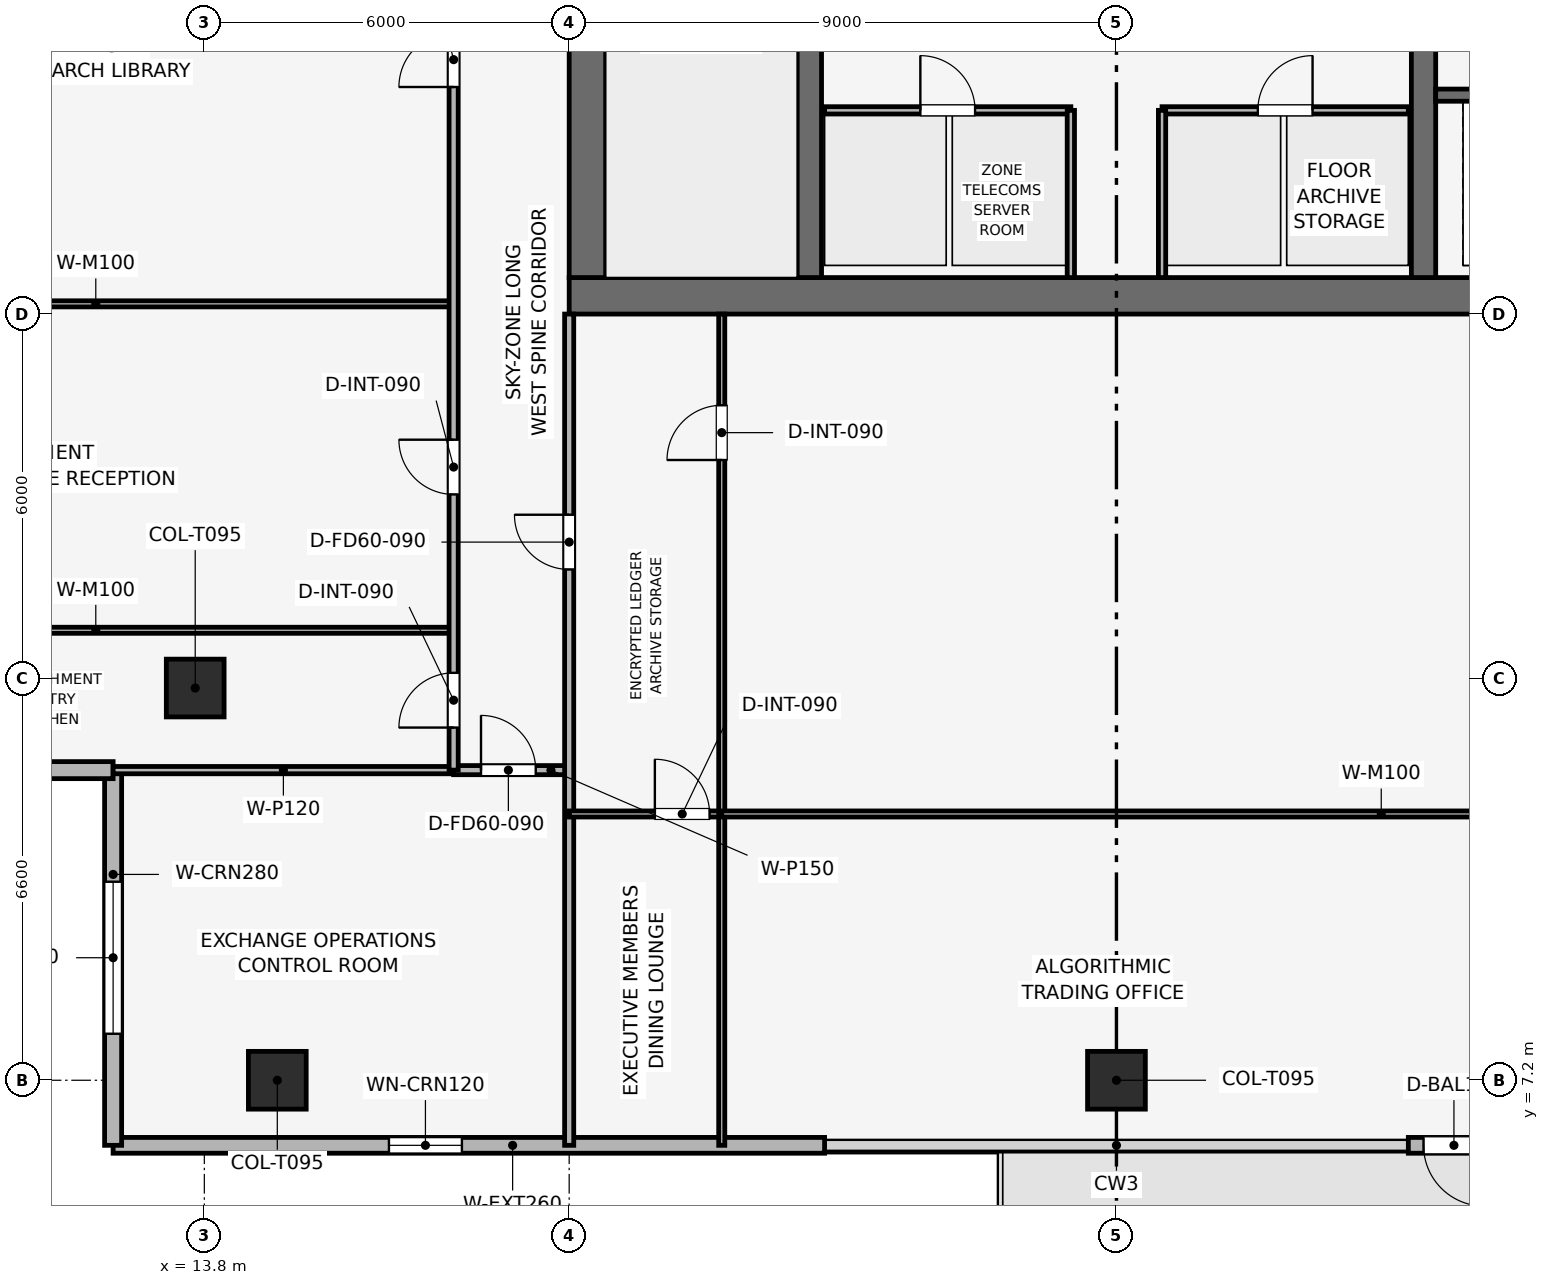
"""IFC4 building model, lengths in metres.
Left out: names, types, materials, properties, quantities, classifications, styles, units other than length and angle.
Written with IfcOpenShell. Run it as: python <this file> out.ifc"""

import sys

from ifc_helpers import new_model, si_unit, direction, frame, frame_2d, origin, origin_2d, place, context, subcontext, project, spatial, rectangle, extrude, element, fill, save


model = new_model("IFC4")
c1 = context("Model", 3, precision=1e-05, world=origin(), true_north=direction((0.0, 1.0)))
c2 = subcontext(c1, "Body", "Model", "MODEL_VIEW")
j1 = project(units=[si_unit("LENGTHUNIT", "METRE"), si_unit("PLANEANGLEUNIT", "RADIAN")], contexts=[c1])
p1 = place(None, origin())
s1 = spatial("IfcSite", under=j1, at=p1, CompositionType="ELEMENT")
p2 = place(p1, origin())
s2 = spatial("IfcBuilding", under=s1, at=p2, CompositionType="ELEMENT")
p3 = place(p2, frame((0.0, 0.0, 321.75)))
s3 = spatial("IfcBuildingStorey", under=s2, at=p3, CompositionType="ELEMENT", Elevation=321.75)
p4 = place(p3, frame((19.8, 20.1, 0.0), z_axis=(0.0, 0.0, 1.0), x_axis=(1.0, 0.0, 0.0)))
e1 = element("IfcWall", 1, at=p4, inside=s3, PredefinedType="SHEAR", context=c2, shape_type="SweptSolid", body=[
    extrude(rectangle(XDim=18.0, YDim=0.6, at=frame_2d((9.0, 0.0))), origin(), (0.0, 0.0, 1.0), 3.75),
])
p5 = place(p3, frame((20.1, 20.4, 0.0), z_axis=(0.0, 0.0, 1.0), x_axis=(0.0, 1.0, 0.0)))
e2 = element("IfcWall", 2, at=p5, inside=s3, PredefinedType="SHEAR", context=c2, shape_type="SweptSolid", body=[
    extrude(rectangle(XDim=16.8, YDim=0.6, at=frame_2d((8.4, 0.0))), origin(), (0.0, 0.0, 1.0), 3.75),
])
p6 = place(p5, frame((10.4, 0.0, 0.0)))
e3 = element("IfcOpeningElement", 3, at=p6, cuts=e2, PredefinedType="OPENING", context=c2, shape_type="SweptSolid", body=[
    extrude(rectangle(XDim=1.1, YDim=2.15, at=frame_2d((0.55, 1.075))), frame((0.0, 0.31, 0.0), z_axis=(0.0, -1.0, 0.0), x_axis=(1.0, 0.0, 0.0)), (0.0, 0.0, 1.0), 0.62),
])
for number, where, z_axis, x_axis in (
    (4, (23.75, 20.4, 0.0), (0.0, 0.0, 1.0), (0.0, 1.0, 0.0)),
    (5, (33.85, 20.4, 0.0), (0.0, 0.0, 1.0), (0.0, 1.0, 0.0)),
):
    element("IfcWall", number, at=place(p3, frame(where, z_axis=z_axis, x_axis=x_axis)), inside=s3, PredefinedType="SHEAR", context=c2, shape_type="SweptSolid", body=[
        extrude(rectangle(XDim=16.8, YDim=0.4, at=frame_2d((8.4, 0.0))), origin(), (0.0, 0.0, 1.0), 3.75),
    ])
for number, where, z_axis, x_axis in (
    (6, (15.0, 7.2, 0.003), (0.0, 0.0, 1.0), (1.0, 0.0, 0.0)),
    (7, (28.8, 7.2, 0.003), (0.0, 0.0, 1.0), (1.0, 0.0, 0.0)),
    (8, (13.65, 13.65, 0.003), (0.0, 0.0, 1.0), (1.0, 0.0, 0.0)),
):
    element("IfcColumn", number, at=place(p3, frame(where, z_axis=z_axis, x_axis=x_axis)), inside=s3, PredefinedType="COLUMN", context=c2, shape_type="SweptSolid", body=[
        extrude(rectangle(XDim=0.95, YDim=0.95, at=origin_2d()), origin(), (0.0, 0.0, 1.0), 3.504),
    ])
p7 = place(p3, frame((45.3, 6.13, 0.0), z_axis=(0.0, 0.0, 1.0), x_axis=(-1.0, 0.0, 0.0)))
e9 = element("IfcWall", 9, at=p7, inside=s3, PredefinedType="SOLIDWALL", context=c2, shape_type="SweptSolid", body=[
    extrude(rectangle(XDim=11.7, YDim=0.26, at=frame_2d((5.85, 0.0))), origin(), (0.0, 0.0, 1.0), 3.51),
])
p8 = place(p7, frame((10.45, 0.0, 0.0)))
e10 = element("IfcOpeningElement", 10, at=p8, cuts=e9, PredefinedType="OPENING", context=c2, shape_type="SweptSolid", body=[
    extrude(rectangle(XDim=1.0, YDim=2.2, at=frame_2d((0.5, 1.1))), frame((0.0, 0.14, 0.0), z_axis=(0.0, -1.0, 0.0), x_axis=(1.0, 0.0, 0.0)), (0.0, 0.0, 1.0), 0.28),
])
p9 = place(p3, frame((24.0, 6.13, 0.0), z_axis=(0.0, 0.0, 1.0), x_axis=(-1.0, 0.0, 0.0)))
e11 = element("IfcWall", 11, at=p9, inside=s3, PredefinedType="SOLIDWALL", context=c2, shape_type="SweptSolid", body=[
    extrude(rectangle(XDim=11.7, YDim=0.26, at=frame_2d((5.85, 0.0))), origin(), (0.0, 0.0, 1.0), 3.51),
])
p10 = place(p9, frame((5.964, 0.0, 0.9)))
e12 = element("IfcOpeningElement", 12, at=p10, cuts=e11, PredefinedType="OPENING", context=c2, shape_type="SweptSolid", body=[
    extrude(rectangle(XDim=1.2, YDim=2.1, at=frame_2d((0.6, 1.05))), frame((0.0, 0.14, 0.0), z_axis=(0.0, -1.0, 0.0), x_axis=(1.0, 0.0, 0.0)), (0.0, 0.0, 1.0), 0.28),
])
p11 = place(p3, frame((12.3, 6.13, 0.0), z_axis=(0.0, 0.0, 1.0), x_axis=(0.0, 1.0, 0.0)))
e13 = element("IfcWall", 13, at=p11, inside=s3, PredefinedType="SOLIDWALL", context=c2, shape_type="SweptSolid", body=[
    extrude(rectangle(XDim=6.17, YDim=0.28, at=frame_2d((3.085, 0.0))), origin(), (0.0, 0.0, 1.0), 3.51),
])
p12 = place(p11, frame((1.835, 0.0, 0.9)))
e14 = element("IfcOpeningElement", 14, at=p12, cuts=e13, PredefinedType="OPENING", context=c2, shape_type="SweptSolid", body=[
    extrude(rectangle(XDim=2.5, YDim=1.9, at=frame_2d((1.25, 0.95))), frame((0.0, 0.15, 0.0), z_axis=(0.0, -1.0, 0.0), x_axis=(1.0, 0.0, 0.0)), (0.0, 0.0, 1.0), 0.3),
])
p13 = place(p3, frame((12.3, 12.3, 0.0), z_axis=(0.0, 0.0, 1.0), x_axis=(-1.0, 0.0, 0.0)))
e15 = element("IfcWall", 15, at=p13, inside=s3, PredefinedType="SOLIDWALL", context=c2, shape_type="SweptSolid", body=[
    extrude(rectangle(XDim=6.17, YDim=0.28, at=frame_2d((3.085, 0.0))), origin(), (0.0, 0.0, 1.0), 3.51),
])
p14 = place(p13, frame((1.835, 0.0, 0.9)))
e16 = element("IfcOpeningElement", 16, at=p14, cuts=e15, PredefinedType="OPENING", context=c2, shape_type="SweptSolid", body=[
    extrude(rectangle(XDim=2.5, YDim=1.9, at=frame_2d((1.25, 0.95))), frame((0.0, 0.15, 0.0), z_axis=(0.0, -1.0, 0.0), x_axis=(1.0, 0.0, 0.0)), (0.0, 0.0, 1.0), 0.3),
])
p15 = place(p3, frame((34.05, 23.4, 0.0), z_axis=(0.0, 0.0, 1.0), x_axis=(1.0, 0.0, 0.0)))
e17 = element("IfcWall", 17, at=p15, inside=s3, PredefinedType="SHEAR", context=c2, shape_type="SweptSolid", body=[
    extrude(rectangle(XDim=3.05, YDim=0.2, at=frame_2d((1.525, 0.0))), origin(), (0.0, 0.0, 1.0), 3.51),
])
p16 = place(p15, frame((1.2, 0.0, 0.0)))
e18 = element("IfcOpeningElement", 18, at=p16, cuts=e17, PredefinedType="OPENING", context=c2, shape_type="SweptSolid", body=[
    extrude(rectangle(XDim=1.1, YDim=2.15, at=frame_2d((0.55, 1.075))), frame((0.0, 0.11, 0.0), z_axis=(0.0, -1.0, 0.0), x_axis=(1.0, 0.0, 0.0)), (0.0, 0.0, 1.0), 0.22),
])
p17 = place(p3, frame((24.0, 23.15, 0.0), z_axis=(0.0, 0.0, 1.0), x_axis=(1.0, 0.0, 0.0)))
e19 = element("IfcWall", 19, at=p17, inside=s3, PredefinedType="PARTITIONING", context=c2, shape_type="SweptSolid", body=[
    extrude(rectangle(XDim=4.05, YDim=0.12, at=frame_2d((2.025, 0.0))), origin(), (0.0, 0.0, 1.0), 3.51),
])
p18 = place(p17, frame((1.575, 0.0, 0.0)))
e20 = element("IfcOpeningElement", 20, at=p18, cuts=e19, PredefinedType="OPENING", context=c2, shape_type="SweptSolid", body=[
    extrude(rectangle(XDim=0.9, YDim=2.1, at=frame_2d((0.45, 1.05))), frame((0.0, 0.07, 0.0), z_axis=(0.0, -1.0, 0.0), x_axis=(1.0, 0.0, 0.0)), (0.0, 0.0, 1.0), 0.14),
])
p19 = place(p3, frame((28.05, 20.4, 0.0), z_axis=(0.0, 0.0, 1.0), x_axis=(0.0, 1.0, 0.0)))
e21 = element("IfcWall", 21, at=p19, inside=s3, PredefinedType="PARTITIONING", context=c2, shape_type="SweptSolid", body=[
    extrude(rectangle(XDim=2.75, YDim=0.12, at=frame_2d((1.375, 0.0))), origin(), (0.0, 0.0, 1.0), 3.51),
])
p20 = place(p3, frame((29.55, 23.15, 0.0), z_axis=(0.0, 0.0, 1.0), x_axis=(1.0, 0.0, 0.0)))
e22 = element("IfcWall", 22, at=p20, inside=s3, PredefinedType="PARTITIONING", context=c2, shape_type="SweptSolid", body=[
    extrude(rectangle(XDim=4.05, YDim=0.12, at=frame_2d((2.025, 0.0))), origin(), (0.0, 0.0, 1.0), 3.51),
])
p21 = place(p20, frame((1.575, 0.0, 0.0)))
e23 = element("IfcOpeningElement", 23, at=p21, cuts=e22, PredefinedType="OPENING", context=c2, shape_type="SweptSolid", body=[
    extrude(rectangle(XDim=0.9, YDim=2.1, at=frame_2d((0.45, 1.05))), frame((0.0, 0.07, 0.0), z_axis=(0.0, -1.0, 0.0), x_axis=(1.0, 0.0, 0.0)), (0.0, 0.0, 1.0), 0.14),
])
p22 = place(p3, frame((29.55, 20.4, 0.0), z_axis=(0.0, 0.0, 1.0), x_axis=(0.0, 1.0, 0.0)))
e24 = element("IfcWall", 24, at=p22, inside=s3, PredefinedType="PARTITIONING", context=c2, shape_type="SweptSolid", body=[
    extrude(rectangle(XDim=2.75, YDim=0.12, at=frame_2d((1.375, 0.0))), origin(), (0.0, 0.0, 1.0), 3.51),
])
p23 = place(p3, frame((6.13, 14.6, 0.0), z_axis=(0.0, 0.0, 1.0), x_axis=(1.0, 0.0, 0.0)))
e25 = element("IfcWall", 25, at=p23, inside=s3, PredefinedType="MOVABLE", context=c2, shape_type="SweptSolid", body=[
    extrude(rectangle(XDim=11.77, YDim=0.1, at=frame_2d((5.885, 0.0))), origin(), (0.0, 0.0, 1.0), 3.095),
])
p24 = place(p3, frame((6.13, 19.968, 0.0), z_axis=(0.0, 0.0, 1.0), x_axis=(1.0, 0.0, 0.0)))
e26 = element("IfcWall", 26, at=p24, inside=s3, PredefinedType="MOVABLE", context=c2, shape_type="SweptSolid", body=[
    extrude(rectangle(XDim=11.77, YDim=0.1, at=frame_2d((5.885, 0.0))), origin(), (0.0, 0.0, 1.0), 3.195),
])
p25 = place(p3, frame((12.3, 12.3, 0.0), z_axis=(0.0, 0.0, 1.0), x_axis=(1.0, 0.0, 0.0)))
e27 = element("IfcWall", 27, at=p25, inside=s3, PredefinedType="PARTITIONING", context=c2, shape_type="SweptSolid", body=[
    extrude(rectangle(XDim=5.6, YDim=0.12, at=frame_2d((2.8, 0.0))), origin(), (0.0, 0.0, 1.0), 3.195),
])
p26 = place(p3, frame((17.9, 12.3, 0.0), z_axis=(0.0, 0.0, 1.0), x_axis=(1.0, 0.0, 0.0)))
e28 = element("IfcWall", 28, at=p26, inside=s3, PredefinedType="PARTITIONING", context=c2, shape_type="SweptSolid", body=[
    extrude(rectangle(XDim=1.9, YDim=0.15, at=frame_2d((0.95, 0.0))), origin(), (0.0, 0.0, 1.0), 3.51),
])
p27 = place(p26, frame((0.45, 0.0, 0.0)))
e29 = element("IfcOpeningElement", 29, at=p27, cuts=e28, PredefinedType="OPENING", context=c2, shape_type="SweptSolid", body=[
    extrude(rectangle(XDim=0.9, YDim=2.1, at=frame_2d((0.45, 1.05))), frame((0.0, 0.085, 0.0), z_axis=(0.0, -1.0, 0.0), x_axis=(1.0, 0.0, 0.0)), (0.0, 0.0, 1.0), 0.17),
])
p28 = place(p3, frame((19.8, 6.13, 0.0), z_axis=(0.0, 0.0, 1.0), x_axis=(0.0, 1.0, 0.0)))
e30 = element("IfcWall", 30, at=p28, inside=s3, PredefinedType="PARTITIONING", context=c2, shape_type="SweptSolid", body=[
    extrude(rectangle(XDim=13.67, YDim=0.15, at=frame_2d((6.835, 0.0))), origin(), (0.0, 0.0, 1.0), 3.095),
])
p29 = place(p28, frame((9.47, 0.0, 0.0)))
e31 = element("IfcOpeningElement", 31, at=p29, cuts=e30, PredefinedType="OPENING", context=c2, shape_type="SweptSolid", body=[
    extrude(rectangle(XDim=0.9, YDim=2.1, at=frame_2d((0.45, 1.05))), frame((0.0, 0.085, 0.0), z_axis=(0.0, -1.0, 0.0), x_axis=(1.0, 0.0, 0.0)), (0.0, 0.0, 1.0), 0.17),
])
p30 = place(p3, frame((19.8, 11.579, 0.0), z_axis=(0.0, 0.0, 1.0), x_axis=(1.0, 0.0, 0.0)))
e32 = element("IfcWall", 32, at=p30, inside=s3, PredefinedType="MOVABLE", context=c2, shape_type="SweptSolid", body=[
    extrude(rectangle(XDim=2.509, YDim=0.1, at=frame_2d((1.254, 0.0))), origin(), (0.0, 0.0, 1.0), 3.095),
])
p31 = place(p30, frame((1.409, 0.0, 0.0)))
e33 = element("IfcOpeningElement", 33, at=p31, cuts=e32, PredefinedType="OPENING", context=c2, shape_type="SweptSolid", body=[
    extrude(rectangle(XDim=0.9, YDim=2.1, at=frame_2d((0.45, 1.05))), frame((0.0, 0.06, 0.0), z_axis=(0.0, -1.0, 0.0), x_axis=(1.0, 0.0, 0.0)), (0.0, 0.0, 1.0), 0.12),
])
p32 = place(p3, frame((22.309, 6.13, 0.0), z_axis=(0.0, 0.0, 1.0), x_axis=(0.0, 1.0, 0.0)))
e34 = element("IfcWall", 34, at=p32, inside=s3, PredefinedType="MOVABLE", context=c2, shape_type="SweptSolid", body=[
    extrude(rectangle(XDim=13.67, YDim=0.1, at=frame_2d((6.835, 0.0))), origin(), (0.0, 0.0, 1.0), 3.135),
])
p33 = place(p32, frame((11.27, 0.0, 0.0)))
e35 = element("IfcOpeningElement", 35, at=p33, cuts=e34, PredefinedType="OPENING", context=c2, shape_type="SweptSolid", body=[
    extrude(rectangle(XDim=0.9, YDim=2.1, at=frame_2d((0.45, 1.05))), frame((0.0, 0.06, 0.0), z_axis=(0.0, -1.0, 0.0), x_axis=(1.0, 0.0, 0.0)), (0.0, 0.0, 1.0), 0.12),
])
p34 = place(p3, frame((22.309, 11.579, 0.0), z_axis=(0.0, 0.0, 1.0), x_axis=(1.0, 0.0, 0.0)))
e36 = element("IfcWall", 36, at=p34, inside=s3, PredefinedType="MOVABLE", context=c2, shape_type="SweptSolid", body=[
    extrude(rectangle(XDim=22.991, YDim=0.1, at=frame_2d((11.496, 0.0))), origin(), (0.0, 0.0, 1.0), 3.095),
])
p35 = place(p34, frame((12.853, 0.0, 0.0)))
e37 = element("IfcOpeningElement", 37, at=p35, cuts=e36, PredefinedType="OPENING", context=c2, shape_type="SweptSolid", body=[
    extrude(rectangle(XDim=0.9, YDim=2.1, at=frame_2d((0.45, 1.05))), frame((0.0, 0.06, 0.0), z_axis=(0.0, -1.0, 0.0), x_axis=(1.0, 0.0, 0.0)), (0.0, 0.0, 1.0), 0.12),
])
p36 = place(p3, frame((17.9, 12.3, 0.0), z_axis=(0.0, 0.0, 1.0), x_axis=(0.0, 1.0, 0.0)))
e38 = element("IfcWall", 38, at=p36, inside=s3, PredefinedType="PARTITIONING", context=c2, shape_type="SweptSolid", body=[
    extrude(rectangle(XDim=27.4, YDim=0.15, at=frame_2d((13.7, 0.0))), origin(), (0.0, 0.0, 1.0), 3.095),
])
p37 = place(p36, frame((0.7, 0.0, 0.0)))
e39 = element("IfcOpeningElement", 39, at=p37, cuts=e38, PredefinedType="OPENING", context=c2, shape_type="SweptSolid", body=[
    extrude(rectangle(XDim=0.9, YDim=2.1, at=frame_2d((0.45, 1.05))), frame((0.0, 0.085, 0.0), z_axis=(0.0, -1.0, 0.0), x_axis=(1.0, 0.0, 0.0)), (0.0, 0.0, 1.0), 0.17),
])
p38 = place(p36, frame((4.534, 0.0, 0.0)))
e40 = element("IfcOpeningElement", 40, at=p38, cuts=e38, PredefinedType="OPENING", context=c2, shape_type="SweptSolid", body=[
    extrude(rectangle(XDim=0.9, YDim=2.1, at=frame_2d((0.45, 1.05))), frame((0.0, 0.085, 0.0), z_axis=(0.0, -1.0, 0.0), x_axis=(1.0, 0.0, 0.0)), (0.0, 0.0, 1.0), 0.17),
])
p39 = place(p36, frame((11.234, 0.0, 0.0)))
e41 = element("IfcOpeningElement", 41, at=p39, cuts=e38, PredefinedType="OPENING", context=c2, shape_type="SweptSolid", body=[
    extrude(rectangle(XDim=0.9, YDim=2.1, at=frame_2d((0.45, 1.05))), frame((0.0, 0.085, 0.0), z_axis=(0.0, -1.0, 0.0), x_axis=(1.0, 0.0, 0.0)), (0.0, 0.0, 1.0), 0.17),
])
p40 = place(p36, frame((16.65, 0.0, 0.0)))
e42 = element("IfcOpeningElement", 42, at=p40, cuts=e38, PredefinedType="OPENING", context=c2, shape_type="SweptSolid", body=[
    extrude(rectangle(XDim=0.9, YDim=2.1, at=frame_2d((0.45, 1.05))), frame((0.0, 0.085, 0.0), z_axis=(0.0, -1.0, 0.0), x_axis=(1.0, 0.0, 0.0)), (0.0, 0.0, 1.0), 0.17),
])
p41 = place(p36, frame((19.55, 0.0, 0.0)))
e43 = element("IfcOpeningElement", 43, at=p41, cuts=e38, PredefinedType="OPENING", context=c2, shape_type="SweptSolid", body=[
    extrude(rectangle(XDim=0.9, YDim=2.1, at=frame_2d((0.45, 1.05))), frame((0.0, 0.085, 0.0), z_axis=(0.0, -1.0, 0.0), x_axis=(1.0, 0.0, 0.0)), (0.0, 0.0, 1.0), 0.17),
])
p42 = place(p36, frame((22.3, 0.0, 0.0)))
e44 = element("IfcOpeningElement", 44, at=p42, cuts=e38, PredefinedType="OPENING", context=c2, shape_type="SweptSolid", body=[
    extrude(rectangle(XDim=0.95, YDim=2.1, at=frame_2d((0.475, 1.05))), frame((0.0, 0.085, 0.0), z_axis=(0.0, -1.0, 0.0), x_axis=(1.0, 0.0, 0.0)), (0.0, 0.0, 1.0), 0.17),
])
p43 = place(p36, frame((25.3, 0.0, 0.0)))
e45 = element("IfcOpeningElement", 45, at=p43, cuts=e38, PredefinedType="OPENING", context=c2, shape_type="SweptSolid", body=[
    extrude(rectangle(XDim=0.9, YDim=2.1, at=frame_2d((0.45, 1.05))), frame((0.0, 0.085, 0.0), z_axis=(0.0, -1.0, 0.0), x_axis=(1.0, 0.0, 0.0)), (0.0, 0.0, 1.0), 0.17),
])
p44 = place(p8, origin())
e46 = element("IfcDoor", 46, at=p44, inside=s3, OperationType="SINGLE_SWING_LEFT", PredefinedType="DOOR", context=c2, shape_type="SweptSolid", body=[
    extrude(rectangle(XDim=1.0, YDim=2.2, at=frame_2d((0.5, 1.1))), frame((0.0, 0.025, 0.0), z_axis=(0.0, -1.0, 0.0), x_axis=(1.0, 0.0, 0.0)), (0.0, 0.0, 1.0), 0.05),
])
fill(e10, e46)
p45 = place(p10, origin())
e47 = element("IfcWindow", 47, at=p45, inside=s3, PartitioningType="SINGLE_PANEL", PredefinedType="WINDOW", context=c2, shape_type="SweptSolid", body=[
    extrude(rectangle(XDim=1.2, YDim=2.1, at=frame_2d((0.6, 1.05))), frame((0.0, 0.03, 0.0), z_axis=(0.0, -1.0, 0.0), x_axis=(1.0, 0.0, 0.0)), (0.0, 0.0, 1.0), 0.06),
])
fill(e12, e47)
p46 = place(p12, origin())
e48 = element("IfcWindow", 48, at=p46, inside=s3, PartitioningType="SINGLE_PANEL", PredefinedType="WINDOW", context=c2, shape_type="SweptSolid", body=[
    extrude(rectangle(XDim=2.5, YDim=1.9, at=frame_2d((1.25, 0.95))), frame((0.0, 0.03, 0.0), z_axis=(0.0, -1.0, 0.0), x_axis=(1.0, 0.0, 0.0)), (0.0, 0.0, 1.0), 0.06),
])
fill(e14, e48)
p47 = place(p18, origin())
e49 = element("IfcDoor", 49, at=p47, inside=s3, OperationType="SINGLE_SWING_LEFT", PredefinedType="DOOR", context=c2, shape_type="SweptSolid", body=[
    extrude(rectangle(XDim=0.9, YDim=2.1, at=frame_2d((0.45, 1.05))), frame((0.0, 0.025, 0.0), z_axis=(0.0, -1.0, 0.0), x_axis=(1.0, 0.0, 0.0)), (0.0, 0.0, 1.0), 0.05),
])
fill(e20, e49)
p48 = place(p21, origin())
e50 = element("IfcDoor", 50, at=p48, inside=s3, OperationType="SINGLE_SWING_RIGHT", PredefinedType="DOOR", context=c2, shape_type="SweptSolid", body=[
    extrude(rectangle(XDim=0.9, YDim=2.1, at=frame_2d((0.45, 1.05))), frame((0.0, 0.025, 0.0), z_axis=(0.0, -1.0, 0.0), x_axis=(1.0, 0.0, 0.0)), (0.0, 0.0, 1.0), 0.05),
])
fill(e23, e50)
p49 = place(p27, origin())
e51 = element("IfcDoor", 51, at=p49, inside=s3, OperationType="SINGLE_SWING_LEFT", PredefinedType="DOOR", context=c2, shape_type="SweptSolid", body=[
    extrude(rectangle(XDim=0.9, YDim=2.1, at=frame_2d((0.45, 1.05))), frame((0.0, 0.025, 0.0), z_axis=(0.0, -1.0, 0.0), x_axis=(1.0, 0.0, 0.0)), (0.0, 0.0, 1.0), 0.05),
])
fill(e29, e51)
p50 = place(p29, origin())
e52 = element("IfcDoor", 52, at=p50, inside=s3, OperationType="SINGLE_SWING_RIGHT", PredefinedType="DOOR", context=c2, shape_type="SweptSolid", body=[
    extrude(rectangle(XDim=0.9, YDim=2.1, at=frame_2d((0.45, 1.05))), frame((0.0, 0.025, 0.0), z_axis=(0.0, -1.0, 0.0), x_axis=(1.0, 0.0, 0.0)), (0.0, 0.0, 1.0), 0.05),
])
fill(e31, e52)
p51 = place(p31, origin())
e53 = element("IfcDoor", 53, at=p51, inside=s3, OperationType="SINGLE_SWING_LEFT", PredefinedType="DOOR", context=c2, shape_type="SweptSolid", body=[
    extrude(rectangle(XDim=0.9, YDim=2.1, at=frame_2d((0.45, 1.05))), frame((0.0, 0.025, 0.0), z_axis=(0.0, -1.0, 0.0), x_axis=(1.0, 0.0, 0.0)), (0.0, 0.0, 1.0), 0.05),
])
fill(e33, e53)
p52 = place(p33, origin())
e54 = element("IfcDoor", 54, at=p52, inside=s3, OperationType="SINGLE_SWING_LEFT", PredefinedType="DOOR", context=c2, shape_type="SweptSolid", body=[
    extrude(rectangle(XDim=0.9, YDim=2.1, at=frame_2d((0.45, 1.05))), frame((0.0, 0.025, 0.0), z_axis=(0.0, -1.0, 0.0), x_axis=(1.0, 0.0, 0.0)), (0.0, 0.0, 1.0), 0.05),
])
fill(e35, e54)
p53 = place(p37, origin())
e55 = element("IfcDoor", 55, at=p53, inside=s3, OperationType="SINGLE_SWING_LEFT", PredefinedType="DOOR", context=c2, shape_type="SweptSolid", body=[
    extrude(rectangle(XDim=0.9, YDim=2.1, at=frame_2d((0.45, 1.05))), frame((0.0, 0.025, 0.0), z_axis=(0.0, -1.0, 0.0), x_axis=(1.0, 0.0, 0.0)), (0.0, 0.0, 1.0), 0.05),
])
fill(e39, e55)
p54 = place(p38, origin())
e56 = element("IfcDoor", 56, at=p54, inside=s3, OperationType="SINGLE_SWING_RIGHT", PredefinedType="DOOR", context=c2, shape_type="SweptSolid", body=[
    extrude(rectangle(XDim=0.9, YDim=2.1, at=frame_2d((0.45, 1.05))), frame((0.0, 0.025, 0.0), z_axis=(0.0, -1.0, 0.0), x_axis=(1.0, 0.0, 0.0)), (0.0, 0.0, 1.0), 0.05),
])
fill(e40, e56)
p55 = place(p39, origin())
e57 = element("IfcDoor", 57, at=p55, inside=s3, OperationType="SINGLE_SWING_LEFT", PredefinedType="DOOR", context=c2, shape_type="SweptSolid", body=[
    extrude(rectangle(XDim=0.9, YDim=2.1, at=frame_2d((0.45, 1.05))), frame((0.0, 0.025, 0.0), z_axis=(0.0, -1.0, 0.0), x_axis=(1.0, 0.0, 0.0)), (0.0, 0.0, 1.0), 0.05),
])
fill(e41, e57)
save(model, sys.argv[1])
